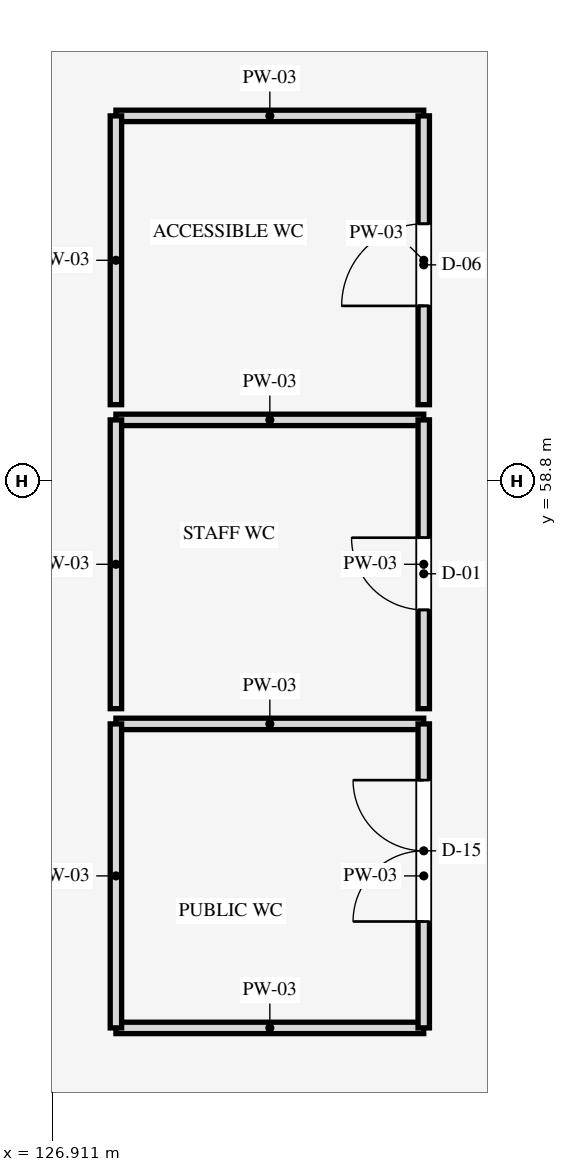
"""IFC4 building model, lengths in metres.
Left out: names, types, materials, properties, quantities, classifications, styles, units other than length and angle.
Written with IfcOpenShell. Run it as: python <this file> out.ifc"""

import sys

from ifc_helpers import new_model, si_unit, direction, frame, frame_2d, origin, place, context, subcontext, project, spatial, rectangle, extrude, element, fill, save


model = new_model("IFC4")
c1 = context("Model", 3, precision=1e-05, world=origin(), true_north=direction((0.0, 1.0)))
c2 = subcontext(c1, "Body", "Model", "MODEL_VIEW")
j1 = project(units=[si_unit("LENGTHUNIT", "METRE"), si_unit("PLANEANGLEUNIT", "RADIAN")], contexts=[c1])
p1 = place(None, origin())
s1 = spatial("IfcSite", under=j1, at=p1, CompositionType="ELEMENT")
p2 = place(p1, origin())
s2 = spatial("IfcBuilding", under=s1, at=p2, CompositionType="ELEMENT")
p3 = place(p2, frame((0.0, 0.0, 14.4)))
s3 = spatial("IfcBuildingStorey", under=s2, at=p3, CompositionType="ELEMENT", Elevation=14.4)
for number, where, z_axis, x_axis in (
    (1, (127.75, 51.6, 0.0), (0.0, 0.0, 1.0), (1.0, 0.0, 0.0)),
    (2, (127.75, 55.6, 0.0), (0.0, 0.0, 1.0), (1.0, 0.0, 0.0)),
):
    element("IfcWall", number, at=place(p3, frame(where, z_axis=z_axis, x_axis=x_axis)), inside=s3, PredefinedType="PARTITIONING", context=c2, shape_type="SweptSolid", body=[
        extrude(rectangle(XDim=4.05, YDim=0.15, at=frame_2d((2.025, 0.0))), origin(), (0.0, 0.0, 1.0), 3.54),
    ])
p4 = place(p3, frame((127.75, 51.6, 0.0), z_axis=(0.0, 0.0, 1.0), x_axis=(0.0, 1.0, 0.0)))
e3 = element("IfcWall", 3, at=p4, inside=s3, PredefinedType="PARTITIONING", context=c2, shape_type="SweptSolid", body=[
    extrude(rectangle(XDim=4.0, YDim=0.15, at=frame_2d((2.0, 0.0))), origin(), (0.0, 0.0, 1.0), 3.54),
])
p5 = place(p3, frame((131.8, 51.6, 0.0), z_axis=(0.0, 0.0, 1.0), x_axis=(0.0, 1.0, 0.0)))
e4 = element("IfcWall", 4, at=p5, inside=s3, PredefinedType="PARTITIONING", context=c2, shape_type="SweptSolid", body=[
    extrude(rectangle(XDim=4.0, YDim=0.15, at=frame_2d((2.0, 0.0))), origin(), (0.0, 0.0, 1.0), 3.54),
])
p6 = place(p5, frame((1.4, 0.0, 0.0)))
e5 = element("IfcOpeningElement", 5, at=p6, cuts=e4, PredefinedType="OPENING", context=c2, shape_type="SweptSolid", body=[
    extrude(rectangle(XDim=1.86, YDim=2.26, at=frame_2d((0.93, 1.13))), frame((0.0, 0.085, 0.0), z_axis=(0.0, -1.0, 0.0), x_axis=(1.0, 0.0, 0.0)), (0.0, 0.0, 1.0), 0.17),
])
p7 = place(p3, frame((127.75, 59.6, 0.0), z_axis=(0.0, 0.0, 1.0), x_axis=(1.0, 0.0, 0.0)))
e6 = element("IfcWall", 6, at=p7, inside=s3, PredefinedType="PARTITIONING", context=c2, shape_type="SweptSolid", body=[
    extrude(rectangle(XDim=4.05, YDim=0.15, at=frame_2d((2.025, 0.0))), origin(), (0.0, 0.0, 1.0), 3.54),
])
p8 = place(p3, frame((127.75, 55.8, 0.0), z_axis=(0.0, 0.0, 1.0), x_axis=(0.0, 1.0, 0.0)))
e7 = element("IfcWall", 7, at=p8, inside=s3, PredefinedType="PARTITIONING", context=c2, shape_type="SweptSolid", body=[
    extrude(rectangle(XDim=3.8, YDim=0.15, at=frame_2d((1.9, 0.0))), origin(), (0.0, 0.0, 1.0), 3.54),
])
p9 = place(p3, frame((131.8, 55.8, 0.0), z_axis=(0.0, 0.0, 1.0), x_axis=(0.0, 1.0, 0.0)))
e8 = element("IfcWall", 8, at=p9, inside=s3, PredefinedType="PARTITIONING", context=c2, shape_type="SweptSolid", body=[
    extrude(rectangle(XDim=3.8, YDim=0.15, at=frame_2d((1.9, 0.0))), origin(), (0.0, 0.0, 1.0), 3.54),
])
p10 = place(p9, frame((1.3, 0.0, 0.0)))
e9 = element("IfcOpeningElement", 9, at=p10, cuts=e8, PredefinedType="OPENING", context=c2, shape_type="SweptSolid", body=[
    extrude(rectangle(XDim=0.95, YDim=2.1, at=frame_2d((0.475, 1.05))), frame((0.0, 0.085, 0.0), z_axis=(0.0, -1.0, 0.0), x_axis=(1.0, 0.0, 0.0)), (0.0, 0.0, 1.0), 0.17),
])
p11 = place(p3, frame((127.75, 63.6, 0.0), z_axis=(0.0, 0.0, 1.0), x_axis=(1.0, 0.0, 0.0)))
e10 = element("IfcWall", 10, at=p11, inside=s3, PredefinedType="PARTITIONING", context=c2, shape_type="SweptSolid", body=[
    extrude(rectangle(XDim=4.05, YDim=0.15, at=frame_2d((2.025, 0.0))), origin(), (0.0, 0.0, 1.0), 3.54),
])
p12 = place(p3, frame((127.75, 59.8, 0.0), z_axis=(0.0, 0.0, 1.0), x_axis=(0.0, 1.0, 0.0)))
e11 = element("IfcWall", 11, at=p12, inside=s3, PredefinedType="PARTITIONING", context=c2, shape_type="SweptSolid", body=[
    extrude(rectangle(XDim=3.8, YDim=0.15, at=frame_2d((1.9, 0.0))), origin(), (0.0, 0.0, 1.0), 3.54),
])
p13 = place(p3, frame((131.8, 59.8, 0.0), z_axis=(0.0, 0.0, 1.0), x_axis=(0.0, 1.0, 0.0)))
e12 = element("IfcWall", 12, at=p13, inside=s3, PredefinedType="PARTITIONING", context=c2, shape_type="SweptSolid", body=[
    extrude(rectangle(XDim=3.8, YDim=0.15, at=frame_2d((1.9, 0.0))), origin(), (0.0, 0.0, 1.0), 3.54),
])
p14 = place(p13, frame((1.3, 0.0, 0.0)))
e13 = element("IfcOpeningElement", 13, at=p14, cuts=e12, PredefinedType="OPENING", context=c2, shape_type="SweptSolid", body=[
    extrude(rectangle(XDim=1.08, YDim=2.12, at=frame_2d((0.54, 1.06))), frame((0.0, 0.085, 0.0), z_axis=(0.0, -1.0, 0.0), x_axis=(1.0, 0.0, 0.0)), (0.0, 0.0, 1.0), 0.17),
])
p15 = place(p6, origin())
e14 = element("IfcDoor", 14, at=p15, inside=s3, OperationType="DOUBLE_DOOR_SINGLE_SWING", PredefinedType="DOOR", context=c2, shape_type="SweptSolid", body=[
    extrude(rectangle(XDim=1.86, YDim=2.26, at=frame_2d((0.93, 1.13))), frame((0.0, 0.025, 0.0), z_axis=(0.0, -1.0, 0.0), x_axis=(1.0, 0.0, 0.0)), (0.0, 0.0, 1.0), 0.05),
])
fill(e5, e14)
p16 = place(p10, origin())
e15 = element("IfcDoor", 15, at=p16, inside=s3, OperationType="SINGLE_SWING_RIGHT", PredefinedType="DOOR", context=c2, shape_type="SweptSolid", body=[
    extrude(rectangle(XDim=0.95, YDim=2.1, at=frame_2d((0.475, 1.05))), frame((0.0, 0.025, 0.0), z_axis=(0.0, -1.0, 0.0), x_axis=(1.0, 0.0, 0.0)), (0.0, 0.0, 1.0), 0.05),
])
fill(e9, e15)
p17 = place(p14, origin())
e16 = element("IfcDoor", 16, at=p17, inside=s3, OperationType="SINGLE_SWING_LEFT", PredefinedType="DOOR", context=c2, shape_type="SweptSolid", body=[
    extrude(rectangle(XDim=1.08, YDim=2.12, at=frame_2d((0.54, 1.06))), frame((0.0, 0.025, 0.0), z_axis=(0.0, -1.0, 0.0), x_axis=(1.0, 0.0, 0.0)), (0.0, 0.0, 1.0), 0.05),
])
fill(e13, e16)
save(model, sys.argv[1])
